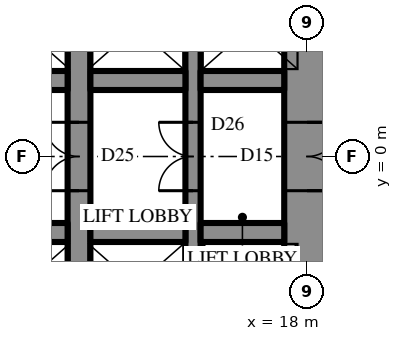
"""IFC4 building model, lengths in metres.
Left out: names, types, materials, properties, quantities, classifications, styles, units other than length and angle.
Written with IfcOpenShell. Run it as: python <this file> out.ifc"""

import sys

from ifc_helpers import new_model, si_unit, direction, frame, frame_2d, origin, place, context, subcontext, project, spatial, rectangle, extrude, element, fill, save


model = new_model("IFC4")
c1 = context("Model", 3, precision=1e-05, world=origin(), true_north=direction((0.0, 1.0)))
c2 = subcontext(c1, "Body", "Model", "MODEL_VIEW")
j1 = project(units=[si_unit("LENGTHUNIT", "METRE"), si_unit("PLANEANGLEUNIT", "RADIAN")], contexts=[c1])
p1 = place(None, origin())
s1 = spatial("IfcSite", under=j1, at=p1, CompositionType="ELEMENT")
p2 = place(p1, origin())
s2 = spatial("IfcBuilding", under=s1, at=p2, CompositionType="ELEMENT")
p3 = place(p2, frame((0.0, 0.0, 18.5)))
s3 = spatial("IfcBuildingStorey", under=s2, at=p3, CompositionType="ELEMENT", Elevation=18.5)
p4 = place(p3, frame((18.0, -10.7, 0.0), z_axis=(0.0, 0.0, 1.0), x_axis=(0.0, 1.0, 0.0)))
e1 = element("IfcWall", 1, at=p4, inside=s3, PredefinedType="SHEAR", context=c2, shape_type="SweptSolid", body=[
    extrude(rectangle(XDim=21.4, YDim=1.2, at=frame_2d((10.7, 0.0))), origin(), (0.0, 0.0, 1.0), 5.0),
])
p5 = place(p4, frame((9.8, 0.0, 0.0)))
e2 = element("IfcOpeningElement", 2, at=p5, cuts=e1, PredefinedType="OPENING", context=c2, shape_type="SweptSolid", body=[
    extrude(rectangle(XDim=1.8, YDim=2.4, at=frame_2d((0.9, 1.2))), frame((0.0, 0.61, 0.0), z_axis=(0.0, -1.0, 0.0), x_axis=(1.0, 0.0, 0.0)), (0.0, 0.0, 1.0), 1.22),
])
p6 = place(p3, frame((12.0, -10.7, 0.0), z_axis=(0.0, 0.0, 1.0), x_axis=(0.0, 1.0, 0.0)))
e3 = element("IfcWall", 3, at=p6, inside=s3, PredefinedType="SHEAR", context=c2, shape_type="SweptSolid", body=[
    extrude(rectangle(XDim=21.4, YDim=0.6, at=frame_2d((10.7, 0.0))), origin(), (0.0, 0.0, 1.0), 5.0),
])
p7 = place(p6, frame((9.8, 0.0, 0.0)))
e4 = element("IfcOpeningElement", 4, at=p7, cuts=e3, PredefinedType="OPENING", context=c2, shape_type="SweptSolid", body=[
    extrude(rectangle(XDim=1.8, YDim=2.4, at=frame_2d((0.9, 1.2))), frame((0.0, 0.31, 0.0), z_axis=(0.0, -1.0, 0.0), x_axis=(1.0, 0.0, 0.0)), (0.0, 0.0, 1.0), 0.62),
])
p8 = place(p3, frame((15.0, -10.7, 0.0), z_axis=(0.0, 0.0, 1.0), x_axis=(0.0, 1.0, 0.0)))
e5 = element("IfcWall", 5, at=p8, inside=s3, PredefinedType="SHEAR", context=c2, shape_type="SweptSolid", body=[
    extrude(rectangle(XDim=21.4, YDim=0.4, at=frame_2d((10.7, 0.0))), origin(), (0.0, 0.0, 1.0), 5.0),
])
p9 = place(p8, frame((9.8, 0.0, 0.0)))
e6 = element("IfcOpeningElement", 6, at=p9, cuts=e5, PredefinedType="OPENING", context=c2, shape_type="SweptSolid", body=[
    extrude(rectangle(XDim=1.8, YDim=2.4, at=frame_2d((0.9, 1.2))), frame((0.0, 0.21, 0.0), z_axis=(0.0, -1.0, 0.0), x_axis=(1.0, 0.0, 0.0)), (0.0, 0.0, 1.0), 0.42),
])
p10 = place(p3, frame((-3.2, 2.0, 0.0), z_axis=(0.0, 0.0, 1.0), x_axis=(1.0, 0.0, 0.0)))
e7 = element("IfcWall", 7, at=p10, inside=s3, PredefinedType="SHEAR", context=c2, shape_type="SweptSolid", body=[
    extrude(rectangle(XDim=14.9, YDim=0.5, at=frame_2d((7.45, 0.0))), origin(), (0.0, 0.0, 1.0), 5.0),
])
p11 = place(p10, frame((1.15, 0.0, 0.0)))
e8 = element("IfcOpeningElement", 8, at=p11, cuts=e7, PredefinedType="OPENING", context=c2, shape_type="SweptSolid", body=[
    extrude(rectangle(XDim=1.1, YDim=2.2, at=frame_2d((0.55, 1.1))), frame((0.0, 0.26, 0.0), z_axis=(0.0, -1.0, 0.0), x_axis=(1.0, 0.0, 0.0)), (0.0, 0.0, 1.0), 0.52),
])
p12 = place(p10, frame((4.15, 0.0, 0.0)))
e9 = element("IfcOpeningElement", 9, at=p12, cuts=e7, PredefinedType="OPENING", context=c2, shape_type="SweptSolid", body=[
    extrude(rectangle(XDim=1.1, YDim=2.2, at=frame_2d((0.55, 1.1))), frame((0.0, 0.26, 0.0), z_axis=(0.0, -1.0, 0.0), x_axis=(1.0, 0.0, 0.0)), (0.0, 0.0, 1.0), 0.52),
])
p13 = place(p10, frame((7.15, 0.0, 0.0)))
e10 = element("IfcOpeningElement", 10, at=p13, cuts=e7, PredefinedType="OPENING", context=c2, shape_type="SweptSolid", body=[
    extrude(rectangle(XDim=1.1, YDim=2.2, at=frame_2d((0.55, 1.1))), frame((0.0, 0.26, 0.0), z_axis=(0.0, -1.0, 0.0), x_axis=(1.0, 0.0, 0.0)), (0.0, 0.0, 1.0), 0.52),
])
p14 = place(p10, frame((10.15, 0.0, 0.0)))
e11 = element("IfcOpeningElement", 11, at=p14, cuts=e7, PredefinedType="OPENING", context=c2, shape_type="SweptSolid", body=[
    extrude(rectangle(XDim=1.1, YDim=2.2, at=frame_2d((0.55, 1.1))), frame((0.0, 0.26, 0.0), z_axis=(0.0, -1.0, 0.0), x_axis=(1.0, 0.0, 0.0)), (0.0, 0.0, 1.0), 0.52),
])
p15 = place(p3, frame((12.3, 2.0, 0.0), z_axis=(0.0, 0.0, 1.0), x_axis=(1.0, 0.0, 0.0)))
e12 = element("IfcWall", 12, at=p15, inside=s3, PredefinedType="SHEAR", context=c2, shape_type="SweptSolid", body=[
    extrude(rectangle(XDim=2.5, YDim=0.5, at=frame_2d((1.25, 0.0))), origin(), (0.0, 0.0, 1.0), 5.0),
])
for number, where, z_axis, x_axis in (
    (13, (15.2, 2.0, 0.0), (0.0, 0.0, 1.0), (1.0, 0.0, 0.0)),
    (14, (17.4, -2.0, 0.0), (0.0, 0.0, 1.0), (-1.0, 0.0, 0.0)),
):
    element("IfcWall", number, at=place(p3, frame(where, z_axis=z_axis, x_axis=x_axis)), inside=s3, PredefinedType="SHEAR", context=c2, shape_type="SweptSolid", body=[
        extrude(rectangle(XDim=2.2, YDim=0.5, at=frame_2d((1.1, 0.0))), origin(), (0.0, 0.0, 1.0), 5.0),
    ])
p16 = place(p3, frame((14.8, -2.0, 0.0), z_axis=(0.0, 0.0, 1.0), x_axis=(-1.0, 0.0, 0.0)))
e15 = element("IfcWall", 15, at=p16, inside=s3, PredefinedType="SHEAR", context=c2, shape_type="SweptSolid", body=[
    extrude(rectangle(XDim=2.5, YDim=0.5, at=frame_2d((1.25, 0.0))), origin(), (0.0, 0.0, 1.0), 5.0),
])
p17 = place(p3, frame((11.7, -2.0, 0.0), z_axis=(0.0, 0.0, 1.0), x_axis=(-1.0, 0.0, 0.0)))
e16 = element("IfcWall", 16, at=p17, inside=s3, PredefinedType="SHEAR", context=c2, shape_type="SweptSolid", body=[
    extrude(rectangle(XDim=5.9, YDim=0.5, at=frame_2d((2.95, 0.0))), origin(), (0.0, 0.0, 1.0), 5.0),
])
p18 = place(p5, frame((1.8, 0.0, 0.0), z_axis=(0.0, 0.0, 1.0), x_axis=(-1.0, 0.0, 0.0)))
e17 = element("IfcDoor", 17, at=p18, inside=s3, OperationType="DOUBLE_DOOR_SINGLE_SWING", PredefinedType="DOOR", context=c2, shape_type="SweptSolid", body=[
    extrude(rectangle(XDim=1.8, YDim=2.4, at=frame_2d((0.9, 1.2))), frame((0.0, 0.025, 0.0), z_axis=(0.0, -1.0, 0.0), x_axis=(1.0, 0.0, 0.0)), (0.0, 0.0, 1.0), 0.05),
])
fill(e2, e17)
p19 = place(p7, origin())
e18 = element("IfcDoor", 18, at=p19, inside=s3, OperationType="DOUBLE_DOOR_SINGLE_SWING", PredefinedType="DOOR", context=c2, shape_type="SweptSolid", body=[
    extrude(rectangle(XDim=1.8, YDim=2.4, at=frame_2d((0.9, 1.2))), frame((0.0, 0.025, 0.0), z_axis=(0.0, -1.0, 0.0), x_axis=(1.0, 0.0, 0.0)), (0.0, 0.0, 1.0), 0.05),
])
fill(e4, e18)
p20 = place(p9, origin())
e19 = element("IfcDoor", 19, at=p20, inside=s3, OperationType="DOUBLE_DOOR_SINGLE_SWING", PredefinedType="DOOR", context=c2, shape_type="SweptSolid", body=[
    extrude(rectangle(XDim=1.8, YDim=2.4, at=frame_2d((0.9, 1.2))), frame((0.0, 0.025, 0.0), z_axis=(0.0, -1.0, 0.0), x_axis=(1.0, 0.0, 0.0)), (0.0, 0.0, 1.0), 0.05),
])
fill(e6, e19)
save(model, sys.argv[1])
